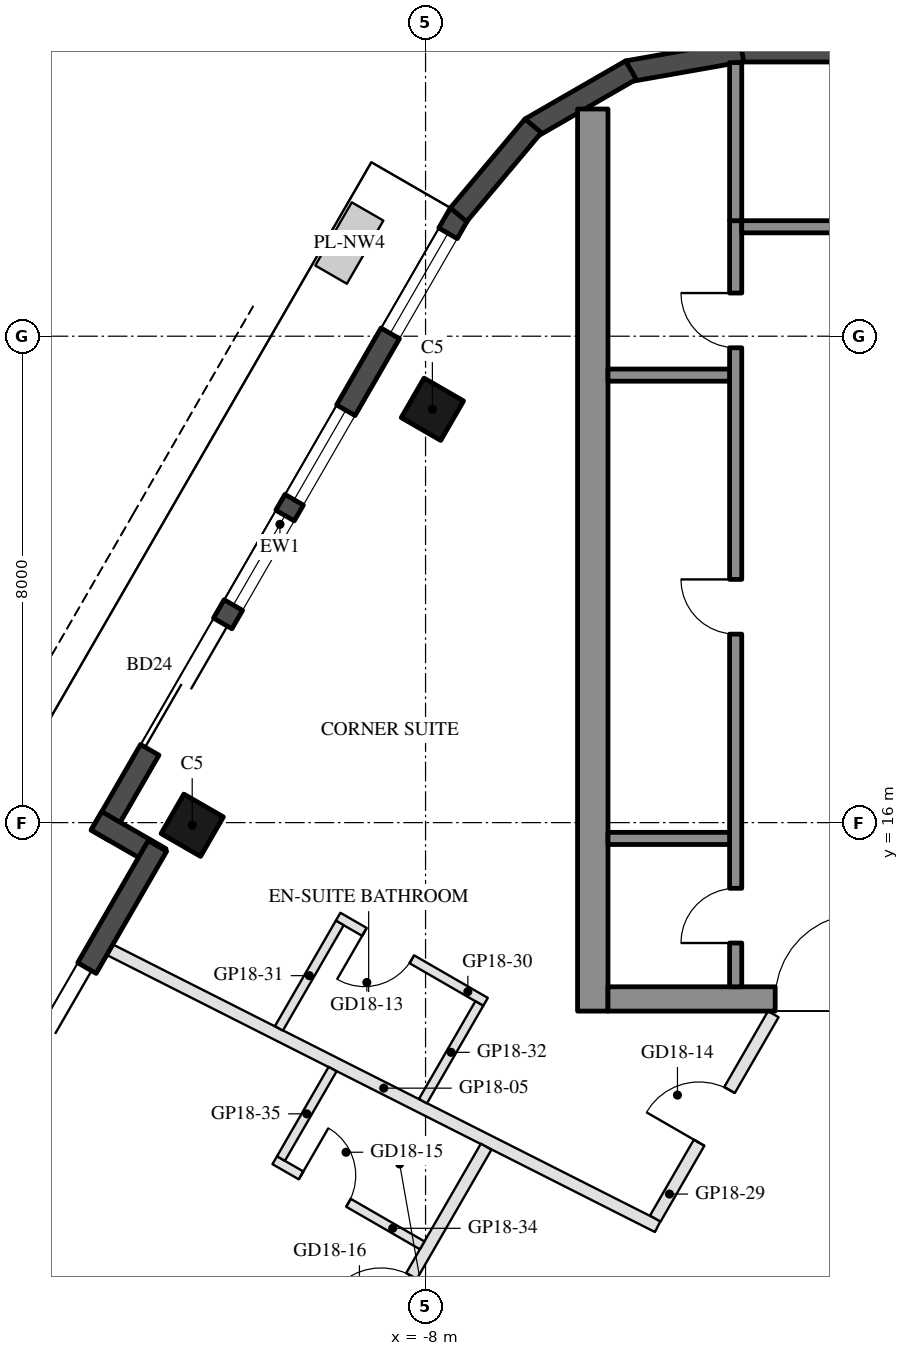
"""IFC4 building model, lengths in metres.
Left out: names, types, materials, properties, quantities, classifications, styles, units other than length and angle.
Written with IfcOpenShell. Run it as: python <this file> out.ifc"""

import sys

from ifc_helpers import new_model, si_unit, direction, frame, frame_2d, origin, origin_2d, place, context, subcontext, project, spatial, rectangle, hollow_rectangle, extrude, element, fill, save


model = new_model("IFC4")
c1 = context("Model", 3, precision=1e-05, world=origin(), true_north=direction((0.0, 1.0)))
c2 = subcontext(c1, "Body", "Model", "MODEL_VIEW")
j1 = project(units=[si_unit("LENGTHUNIT", "METRE"), si_unit("PLANEANGLEUNIT", "RADIAN")], contexts=[c1])
p1 = place(None, origin())
s1 = spatial("IfcSite", under=j1, at=p1, CompositionType="ELEMENT")
p2 = place(p1, origin())
s2 = spatial("IfcBuilding", under=s1, at=p2, CompositionType="ELEMENT")
p3 = place(p2, frame((0.0, 0.0, 198.4)))
s3 = spatial("IfcBuildingStorey", under=s2, at=p3, CompositionType="ELEMENT", Elevation=198.4)
for number, where, z_axis, x_axis in (
    (1, (-7.888, 22.798, 0.0), (0.0, 0.0, 1.0), (0.5, 0.866, 0.0)),
    (2, (-11.838, 15.957, 0.0), (0.0, 0.0, 1.0), (0.5, 0.866, 0.0)),
):
    element("IfcColumn", number, at=place(p3, frame(where, z_axis=z_axis, x_axis=x_axis)), inside=s3, PredefinedType="COLUMN", context=c2, shape_type="SweptSolid", body=[
        extrude(hollow_rectangle(XDim=0.75, YDim=0.75, WallThickness=0.035, at=origin_2d()), origin(), (0.0, 0.0, 1.0), 3.7),
    ])
p4 = place(p3, frame((-7.441, 26.022, 0.0), z_axis=(0.0, 0.0, 1.0), x_axis=(-0.499992533062, -0.86602971478, 0.0)))
e3 = element("IfcWall", 3, at=p4, inside=s3, PredefinedType="SOLIDWALL", context=c2, shape_type="SweptSolid", body=[
    extrude(rectangle(XDim=11.816, YDim=0.35, at=frame_2d((5.908, 0.0))), origin(), (0.0, 0.0, 1.0), 3.55),
])
p5 = place(p4, frame((0.381, 0.0, 0.3)))
e4 = element("IfcOpeningElement", 4, at=p5, cuts=e3, PredefinedType="OPENING", context=c2, shape_type="SweptSolid", body=[
    extrude(rectangle(XDim=1.9, YDim=2.65, at=frame_2d((0.95, 1.325))), frame((0.0, 0.185, 0.0), z_axis=(0.0, -1.0, 0.0), x_axis=(1.0, 0.0, 0.0)), (0.0, 0.0, 1.0), 0.37),
])
p6 = place(p4, frame((7.791, 0.0, 0.0)))
e5 = element("IfcOpeningElement", 5, at=p6, cuts=e3, PredefinedType="OPENING", context=c2, shape_type="SweptSolid", body=[
    extrude(rectangle(XDim=2.4, YDim=2.4, at=frame_2d((1.2, 1.2))), frame((0.0, 0.185, 0.0), z_axis=(0.0, -1.0, 0.0), x_axis=(1.0, 0.0, 0.0)), (0.0, 0.0, 1.0), 0.37),
])
p7 = place(p4, frame((3.741, 0.0, 0.3)))
e6 = element("IfcOpeningElement", 6, at=p7, cuts=e3, PredefinedType="OPENING", context=c2, shape_type="SweptSolid", body=[
    extrude(rectangle(XDim=1.7, YDim=2.65, at=frame_2d((0.85, 1.325))), frame((0.0, 0.185, 0.0), z_axis=(0.0, -1.0, 0.0), x_axis=(1.0, 0.0, 0.0)), (0.0, 0.0, 1.0), 0.37),
])
p8 = place(p4, frame((5.741, 0.0, 0.3)))
e7 = element("IfcOpeningElement", 7, at=p8, cuts=e3, PredefinedType="OPENING", context=c2, shape_type="SweptSolid", body=[
    extrude(rectangle(XDim=1.7, YDim=2.65, at=frame_2d((0.85, 1.325))), frame((0.0, 0.185, 0.0), z_axis=(0.0, -1.0, 0.0), x_axis=(1.0, 0.0, 0.0)), (0.0, 0.0, 1.0), 0.37),
])
p9 = place(p3, frame((-13.413, 16.029, 0.0), z_axis=(0.0, 0.0, 1.0), x_axis=(0.866005645448, -0.500034220881, 0.0)))
e8 = element("IfcWall", 8, at=p9, inside=s3, PredefinedType="SOLIDWALL", context=c2, shape_type="SweptSolid", body=[
    extrude(rectangle(XDim=1.22, YDim=0.35, at=frame_2d((0.61, 0.0))), origin(), (0.0, 0.0, 1.0), 3.55),
])
p10 = place(p3, frame((-12.409, 15.617, 0.0), z_axis=(0.0, 0.0, 1.0), x_axis=(-0.500003597184, -0.866023326939, 0.0)))
e9 = element("IfcWall", 9, at=p10, inside=s3, PredefinedType="SOLIDWALL", context=c2, shape_type="SweptSolid", body=[
    extrude(rectangle(XDim=6.74, YDim=0.35, at=frame_2d((3.37, 0.0))), origin(), (0.0, 0.0, 1.0), 3.55),
])
p11 = place(p10, frame((2.32, 0.0, 0.0)))
e10 = element("IfcOpeningElement", 10, at=p11, cuts=e9, PredefinedType="OPENING", context=c2, shape_type="SweptSolid", body=[
    extrude(rectangle(XDim=2.4, YDim=2.4, at=frame_2d((1.2, 1.2))), frame((0.0, 0.185, 0.0), z_axis=(0.0, -1.0, 0.0), x_axis=(1.0, 0.0, 0.0)), (0.0, 0.0, 1.0), 0.37),
])
p12 = place(p10, frame((5.02, 0.0, 0.3)))
e11 = element("IfcOpeningElement", 11, at=p12, cuts=e9, PredefinedType="OPENING", context=c2, shape_type="SweptSolid", body=[
    extrude(rectangle(XDim=0.9, YDim=2.65, at=frame_2d((0.45, 1.325))), frame((0.0, 0.185, 0.0), z_axis=(0.0, -1.0, 0.0), x_axis=(1.0, 0.0, 0.0)), (0.0, 0.0, 1.0), 0.37),
])
p13 = place(p3, frame((2.829, 28.685, 0.0), z_axis=(0.0, 0.0, 1.0), x_axis=(-1.0, 0.0, 0.0)))
e12 = element("IfcWall", 12, at=p13, inside=s3, PredefinedType="SOLIDWALL", context=c2, shape_type="SweptSolid", body=[
    extrude(rectangle(XDim=5.658, YDim=0.35, at=frame_2d((2.829, 0.0))), origin(), (0.0, 0.0, 1.0), 3.55),
])
for number, where, z_axis, x_axis in (
    (13, (-2.799, 28.688, 0.0), (0.0, 0.0, 1.0), (-0.985, -0.174, 0.0)),
    (14, (-4.623, 28.377, 0.0), (0.0, 0.0, 1.0), (-0.866, -0.5, 0.0)),
):
    element("IfcWall", number, at=place(p3, frame(where, z_axis=z_axis, x_axis=x_axis)), inside=s3, PredefinedType="SOLIDWALL", context=c2, shape_type="SweptSolid", body=[
        extrude(rectangle(XDim=1.91, YDim=0.35, at=frame_2d((0.955, 0.0))), origin(), (0.0, 0.0, 1.0), 3.55),
    ])
p14 = place(p3, frame((-6.23, 27.461, 0.0), z_axis=(0.0, 0.0, 1.0), x_axis=(-0.642808304945, -0.766027077259, 0.0)))
e15 = element("IfcWall", 15, at=p14, inside=s3, PredefinedType="SOLIDWALL", context=c2, shape_type="SweptSolid", body=[
    extrude(rectangle(XDim=1.91, YDim=0.35, at=frame_2d((0.955, 0.0))), origin(), (0.0, 0.0, 1.0), 3.55),
])
p15 = place(p3, frame((-5.25, 12.9, 0.0), z_axis=(0.0, 0.0, 1.0), x_axis=(0.0, 1.0, 0.0)))
e16 = element("IfcWall", 16, at=p15, inside=s3, PredefinedType="SHEAR", context=c2, shape_type="SweptSolid", body=[
    extrude(rectangle(XDim=14.837, YDim=0.5, at=frame_2d((7.418, 0.0))), origin(), (0.0, 0.0, 1.0), 3.5),
])
p16 = place(p3, frame((5.0, 13.1, 0.0), z_axis=(0.0, 0.0, 1.0), x_axis=(-1.0, 0.0, 0.0)))
e17 = element("IfcWall", 17, at=p16, inside=s3, PredefinedType="SHEAR", context=c2, shape_type="SweptSolid", body=[
    extrude(rectangle(XDim=10.0, YDim=0.4, at=frame_2d((5.0, 0.0))), origin(), (0.0, 0.0, 1.0), 3.5),
])
p17 = place(p16, frame((3.55, 0.0, 0.0)))
e18 = element("IfcOpeningElement", 18, at=p17, cuts=e17, PredefinedType="OPENING", context=c2, shape_type="SweptSolid", body=[
    extrude(rectangle(XDim=1.1, YDim=2.1, at=frame_2d((0.55, 1.05))), frame((0.0, 0.21, 0.0), z_axis=(0.0, -1.0, 0.0), x_axis=(1.0, 0.0, 0.0)), (0.0, 0.0, 1.0), 0.42),
])
p18 = place(p16, frame((5.85, 0.0, 0.0)))
e19 = element("IfcOpeningElement", 19, at=p18, cuts=e17, PredefinedType="OPENING", context=c2, shape_type="SweptSolid", body=[
    extrude(rectangle(XDim=1.4, YDim=2.1, at=frame_2d((0.7, 1.05))), frame((0.0, 0.21, 0.0), z_axis=(0.0, -1.0, 0.0), x_axis=(1.0, 0.0, 0.0)), (0.0, 0.0, 1.0), 0.42),
])
p19 = place(p3, frame((-2.9, 13.3, 0.0), z_axis=(0.0, 0.0, 1.0), x_axis=(0.0, 1.0, 0.0)))
e20 = element("IfcWall", 20, at=p19, inside=s3, PredefinedType="SHEAR", context=c2, shape_type="SweptSolid", body=[
    extrude(rectangle(XDim=12.6, YDim=0.2, at=frame_2d((6.3, 0.0))), origin(), (0.0, 0.0, 1.0), 3.5),
])
p20 = place(p19, frame((0.72, 0.0, 0.0)))
e21 = element("IfcOpeningElement", 21, at=p20, cuts=e20, PredefinedType="OPENING", context=c2, shape_type="SweptSolid", body=[
    extrude(rectangle(XDim=0.9, YDim=2.1, at=frame_2d((0.45, 1.05))), frame((0.0, 0.11, 0.0), z_axis=(0.0, -1.0, 0.0), x_axis=(1.0, 0.0, 0.0)), (0.0, 0.0, 1.0), 0.22),
])
p21 = place(p19, frame((5.8, 0.0, 0.0)))
e22 = element("IfcOpeningElement", 22, at=p21, cuts=e20, PredefinedType="OPENING", context=c2, shape_type="SweptSolid", body=[
    extrude(rectangle(XDim=0.9, YDim=2.1, at=frame_2d((0.45, 1.05))), frame((0.0, 0.11, 0.0), z_axis=(0.0, -1.0, 0.0), x_axis=(1.0, 0.0, 0.0)), (0.0, 0.0, 1.0), 0.22),
])
p22 = place(p19, frame((10.51, 0.0, 0.0)))
e23 = element("IfcOpeningElement", 23, at=p22, cuts=e20, PredefinedType="OPENING", context=c2, shape_type="SweptSolid", body=[
    extrude(rectangle(XDim=0.9, YDim=2.1, at=frame_2d((0.45, 1.05))), frame((0.0, 0.11, 0.0), z_axis=(0.0, -1.0, 0.0), x_axis=(1.0, 0.0, 0.0)), (0.0, 0.0, 1.0), 0.22),
])
p23 = place(p3, frame((-0.4, 25.8, 0.0), z_axis=(0.0, 0.0, 1.0), x_axis=(-1.0, 0.0, 0.0)))
e24 = element("IfcWall", 24, at=p23, inside=s3, PredefinedType="SHEAR", context=c2, shape_type="SweptSolid", body=[
    extrude(rectangle(XDim=2.4, YDim=0.2, at=frame_2d((1.2, 0.0))), origin(), (0.0, 0.0, 1.0), 3.5),
])
for number, where, z_axis, x_axis in (
    (25, (-3.0, 15.74, 0.0), (0.0, 0.0, 1.0), (-1.0, 0.0, 0.0)),
    (26, (-3.0, 23.36, 0.0), (0.0, 0.0, 1.0), (-1.0, 0.0, 0.0)),
):
    element("IfcWall", number, at=place(p3, frame(where, z_axis=z_axis, x_axis=x_axis)), inside=s3, PredefinedType="SHEAR", context=c2, shape_type="SweptSolid", body=[
        extrude(rectangle(XDim=2.0, YDim=0.2, at=frame_2d((1.0, 0.0))), origin(), (0.0, 0.0, 1.0), 3.5),
    ])
p24 = place(p3, frame((-2.9, 25.9, 0.0), z_axis=(0.0, 0.0, 1.0), x_axis=(0.0, 1.0, 0.0)))
e27 = element("IfcWall", 27, at=p24, inside=s3, PredefinedType="SHEAR", context=c2, shape_type="SweptSolid", body=[
    extrude(rectangle(XDim=2.6, YDim=0.2, at=frame_2d((1.3, 0.0))), origin(), (0.0, 0.0, 1.0), 3.5),
])
p25 = place(p3, frame((-13.192, 13.91, 0.0), z_axis=(0.0, 0.0, 1.0), x_axis=(0.892469554868, -0.451107629766, 0.0)))
e28 = element("IfcWall", 28, at=p25, inside=s3, PredefinedType="PARTITIONING", context=c2, shape_type="SweptSolid", body=[
    extrude(rectangle(XDim=10.096, YDim=0.2, at=frame_2d((5.048, 0.0))), origin(), (0.0, 0.0, 1.0), 3.06),
])
p26 = place(p3, frame((-4.222, 9.488, 0.0), z_axis=(0.0, 0.0, 1.0), x_axis=(0.49998736472, 0.866032698644, 0.0)))
e29 = element("IfcWall", 29, at=p26, inside=s3, PredefinedType="PARTITIONING", context=c2, shape_type="SweptSolid", body=[
    extrude(rectangle(XDim=3.882, YDim=0.2, at=frame_2d((1.941, 0.0))), origin(), (0.0, 0.0, 1.0), 2.95),
])
p27 = place(p26, frame((1.441, 0.0, 0.0)))
e30 = element("IfcOpeningElement", 30, at=p27, cuts=e29, PredefinedType="OPENING", context=c2, shape_type="SweptSolid", body=[
    extrude(rectangle(XDim=1.0, YDim=2.1, at=frame_2d((0.5, 1.05))), frame((0.0, 0.11, 0.0), z_axis=(0.0, -1.0, 0.0), x_axis=(1.0, 0.0, 0.0)), (0.0, 0.0, 1.0), 0.22),
])
p28 = place(p3, frame((-7.013, 13.052, 0.0), z_axis=(0.0, 0.0, 1.0), x_axis=(-0.866034573852, 0.49998411664, 0.0)))
e31 = element("IfcWall", 31, at=p28, inside=s3, PredefinedType="PARTITIONING", context=c2, shape_type="SweptSolid", body=[
    extrude(rectangle(XDim=2.8, YDim=0.15, at=frame_2d((1.4, 0.0))), origin(), (0.0, 0.0, 1.0), 2.95),
])
p29 = place(p28, frame((1.4, 0.0, 0.0)))
e32 = element("IfcOpeningElement", 32, at=p29, cuts=e31, PredefinedType="OPENING", context=c2, shape_type="SweptSolid", body=[
    extrude(rectangle(XDim=0.9, YDim=2.1, at=frame_2d((0.45, 1.05))), frame((0.0, 0.085, 0.0), z_axis=(0.0, -1.0, 0.0), x_axis=(1.0, 0.0, 0.0)), (0.0, 0.0, 1.0), 0.17),
])
p30 = place(p3, frame((-9.411, 14.35, 0.0), z_axis=(0.0, 0.0, 1.0), x_axis=(-0.499982900776, -0.866035275801, 0.0)))
e33 = element("IfcWall", 33, at=p30, inside=s3, PredefinedType="PARTITIONING", context=c2, shape_type="SweptSolid", body=[
    extrude(rectangle(XDim=2.001, YDim=0.15, at=frame_2d((1.001, 0.0))), origin(), (0.0, 0.0, 1.0), 3.55),
])
p31 = place(p3, frame((-7.116, 13.025, 0.0), z_axis=(0.0, 0.0, 1.0), x_axis=(-0.4999770169, -0.866038672677, 0.0)))
e34 = element("IfcWall", 34, at=p31, inside=s3, PredefinedType="PARTITIONING", context=c2, shape_type="SweptSolid", body=[
    extrude(rectangle(XDim=1.854, YDim=0.15, at=frame_2d((0.927, 0.0))), origin(), (0.0, 0.0, 1.0), 3.55),
])
p32 = place(p3, frame((-11.962, 2.081, 0.0), z_axis=(0.0, 0.0, 1.0), x_axis=(0.500007290723, 0.866021194443, 0.0)))
e35 = element("IfcWall", 35, at=p32, inside=s3, PredefinedType="PARTITIONING", context=c2, shape_type="SweptSolid", body=[
    extrude(rectangle(XDim=9.917, YDim=0.2, at=frame_2d((4.958, 0.0))), origin(), (0.0, 0.0, 1.0), 2.95),
])
p33 = place(p32, frame((6.462, 0.0, 0.0)))
e36 = element("IfcOpeningElement", 36, at=p33, cuts=e35, PredefinedType="OPENING", context=c2, shape_type="SweptSolid", body=[
    extrude(rectangle(XDim=1.0, YDim=2.1, at=frame_2d((0.5, 1.05))), frame((0.0, 0.11, 0.0), z_axis=(0.0, -1.0, 0.0), x_axis=(1.0, 0.0, 0.0)), (0.0, 0.0, 1.0), 0.22),
])
p34 = place(p3, frame((-10.48, 10.448, 0.0), z_axis=(0.0, 0.0, 1.0), x_axis=(0.865996816683, -0.500049511043, 0.0)))
e37 = element("IfcWall", 37, at=p34, inside=s3, PredefinedType="PARTITIONING", context=c2, shape_type="SweptSolid", body=[
    extrude(rectangle(XDim=2.8, YDim=0.15, at=frame_2d((1.4, 0.0))), origin(), (0.0, 0.0, 1.0), 2.95),
])
p35 = place(p34, frame((0.5, 0.0, 0.0)))
e38 = element("IfcOpeningElement", 38, at=p35, cuts=e37, PredefinedType="OPENING", context=c2, shape_type="SweptSolid", body=[
    extrude(rectangle(XDim=0.9, YDim=2.1, at=frame_2d((0.45, 1.05))), frame((0.0, 0.085, 0.0), z_axis=(0.0, -1.0, 0.0), x_axis=(1.0, 0.0, 0.0)), (0.0, 0.0, 1.0), 0.17),
])
p36 = place(p3, frame((-9.529, 11.946, 0.0), z_axis=(0.0, 0.0, 1.0), x_axis=(-0.499942281444, -0.866058725044, 0.0)))
e39 = element("IfcWall", 39, at=p36, inside=s3, PredefinedType="PARTITIONING", context=c2, shape_type="SweptSolid", body=[
    extrude(rectangle(XDim=1.698, YDim=0.15, at=frame_2d((0.849, 0.0))), origin(), (0.0, 0.0, 1.0), 2.95),
])
p37 = place(p5, origin())
e40 = element("IfcWindow", 40, at=p37, inside=s3, PartitioningType="SINGLE_PANEL", PredefinedType="WINDOW", context=c2, shape_type="SweptSolid", body=[
    extrude(rectangle(XDim=1.9, YDim=2.65, at=frame_2d((0.95, 1.325))), frame((0.0, 0.03, 0.0), z_axis=(0.0, -1.0, 0.0), x_axis=(1.0, 0.0, 0.0)), (0.0, 0.0, 1.0), 0.06),
])
fill(e4, e40)
p38 = place(p6, frame((2.4, 0.0, 0.0), z_axis=(0.0, 0.0, 1.0), x_axis=(-1.0, 0.0, 0.0)))
e41 = element("IfcDoor", 41, at=p38, inside=s3, OperationType="SLIDING_TO_LEFT", PredefinedType="DOOR", context=c2, shape_type="SweptSolid", body=[
    extrude(rectangle(XDim=2.4, YDim=2.4, at=frame_2d((1.2, 1.2))), frame((0.0, 0.025, 0.0), z_axis=(0.0, -1.0, 0.0), x_axis=(1.0, 0.0, 0.0)), (0.0, 0.0, 1.0), 0.05),
])
fill(e5, e41)
p39 = place(p7, origin())
e42 = element("IfcWindow", 42, at=p39, inside=s3, PartitioningType="SINGLE_PANEL", PredefinedType="WINDOW", context=c2, shape_type="SweptSolid", body=[
    extrude(rectangle(XDim=1.7, YDim=2.65, at=frame_2d((0.85, 1.325))), frame((0.0, 0.03, 0.0), z_axis=(0.0, -1.0, 0.0), x_axis=(1.0, 0.0, 0.0)), (0.0, 0.0, 1.0), 0.06),
])
fill(e6, e42)
p40 = place(p8, origin())
e43 = element("IfcWindow", 43, at=p40, inside=s3, PartitioningType="SINGLE_PANEL", PredefinedType="WINDOW", context=c2, shape_type="SweptSolid", body=[
    extrude(rectangle(XDim=1.7, YDim=2.65, at=frame_2d((0.85, 1.325))), frame((0.0, 0.03, 0.0), z_axis=(0.0, -1.0, 0.0), x_axis=(1.0, 0.0, 0.0)), (0.0, 0.0, 1.0), 0.06),
])
fill(e7, e43)
p41 = place(p11, frame((2.4, 0.0, 0.0), z_axis=(0.0, 0.0, 1.0), x_axis=(-1.0, 0.0, 0.0)))
e44 = element("IfcDoor", 44, at=p41, inside=s3, OperationType="SLIDING_TO_LEFT", PredefinedType="DOOR", context=c2, shape_type="SweptSolid", body=[
    extrude(rectangle(XDim=2.4, YDim=2.4, at=frame_2d((1.2, 1.2))), frame((0.0, 0.025, 0.0), z_axis=(0.0, -1.0, 0.0), x_axis=(1.0, 0.0, 0.0)), (0.0, 0.0, 1.0), 0.05),
])
fill(e10, e44)
p42 = place(p20, origin())
e45 = element("IfcDoor", 45, at=p42, inside=s3, OperationType="SINGLE_SWING_LEFT", PredefinedType="DOOR", context=c2, shape_type="SweptSolid", body=[
    extrude(rectangle(XDim=0.9, YDim=2.1, at=frame_2d((0.45, 1.05))), frame((0.0, 0.025, 0.0), z_axis=(0.0, -1.0, 0.0), x_axis=(1.0, 0.0, 0.0)), (0.0, 0.0, 1.0), 0.05),
])
fill(e21, e45)
p43 = place(p21, origin())
e46 = element("IfcDoor", 46, at=p43, inside=s3, OperationType="SINGLE_SWING_RIGHT", PredefinedType="DOOR", context=c2, shape_type="SweptSolid", body=[
    extrude(rectangle(XDim=0.9, YDim=2.1, at=frame_2d((0.45, 1.05))), frame((0.0, 0.025, 0.0), z_axis=(0.0, -1.0, 0.0), x_axis=(1.0, 0.0, 0.0)), (0.0, 0.0, 1.0), 0.05),
])
fill(e22, e46)
p44 = place(p22, origin())
e47 = element("IfcDoor", 47, at=p44, inside=s3, OperationType="SINGLE_SWING_RIGHT", PredefinedType="DOOR", context=c2, shape_type="SweptSolid", body=[
    extrude(rectangle(XDim=0.9, YDim=2.1, at=frame_2d((0.45, 1.05))), frame((0.0, 0.025, 0.0), z_axis=(0.0, -1.0, 0.0), x_axis=(1.0, 0.0, 0.0)), (0.0, 0.0, 1.0), 0.05),
])
fill(e23, e47)
p45 = place(p18, frame((1.4, 0.0, 0.0), z_axis=(0.0, 0.0, 1.0), x_axis=(-1.0, 0.0, 0.0)))
e48 = element("IfcDoor", 48, at=p45, inside=s3, OperationType="DOUBLE_DOOR_SINGLE_SWING", PredefinedType="DOOR", context=c2, shape_type="SweptSolid", body=[
    extrude(rectangle(XDim=1.4, YDim=2.1, at=frame_2d((0.7, 1.05))), frame((0.0, 0.025, 0.0), z_axis=(0.0, -1.0, 0.0), x_axis=(1.0, 0.0, 0.0)), (0.0, 0.0, 1.0), 0.05),
])
fill(e19, e48)
p46 = place(p29, origin())
e49 = element("IfcDoor", 49, at=p46, inside=s3, OperationType="SINGLE_SWING_RIGHT", PredefinedType="DOOR", context=c2, shape_type="SweptSolid", body=[
    extrude(rectangle(XDim=0.9, YDim=2.1, at=frame_2d((0.45, 1.05))), frame((0.0, 0.025, 0.0), z_axis=(0.0, -1.0, 0.0), x_axis=(1.0, 0.0, 0.0)), (0.0, 0.0, 1.0), 0.05),
])
fill(e32, e49)
p47 = place(p27, origin())
e50 = element("IfcDoor", 50, at=p47, inside=s3, OperationType="SINGLE_SWING_LEFT", PredefinedType="DOOR", context=c2, shape_type="SweptSolid", body=[
    extrude(rectangle(XDim=1.0, YDim=2.1, at=frame_2d((0.5, 1.05))), frame((0.0, 0.025, 0.0), z_axis=(0.0, -1.0, 0.0), x_axis=(1.0, 0.0, 0.0)), (0.0, 0.0, 1.0), 0.05),
])
fill(e30, e50)
p48 = place(p35, origin())
e51 = element("IfcDoor", 51, at=p48, inside=s3, OperationType="SINGLE_SWING_LEFT", PredefinedType="DOOR", context=c2, shape_type="SweptSolid", body=[
    extrude(rectangle(XDim=0.9, YDim=2.1, at=frame_2d((0.45, 1.05))), frame((0.0, 0.025, 0.0), z_axis=(0.0, -1.0, 0.0), x_axis=(1.0, 0.0, 0.0)), (0.0, 0.0, 1.0), 0.05),
])
fill(e38, e51)
p49 = place(p33, origin())
e52 = element("IfcDoor", 52, at=p49, inside=s3, OperationType="SINGLE_SWING_LEFT", PredefinedType="DOOR", context=c2, shape_type="SweptSolid", body=[
    extrude(rectangle(XDim=1.0, YDim=2.1, at=frame_2d((0.5, 1.05))), frame((0.0, 0.025, 0.0), z_axis=(0.0, -1.0, 0.0), x_axis=(1.0, 0.0, 0.0)), (0.0, 0.0, 1.0), 0.05),
])
fill(e36, e52)
save(model, sys.argv[1])
